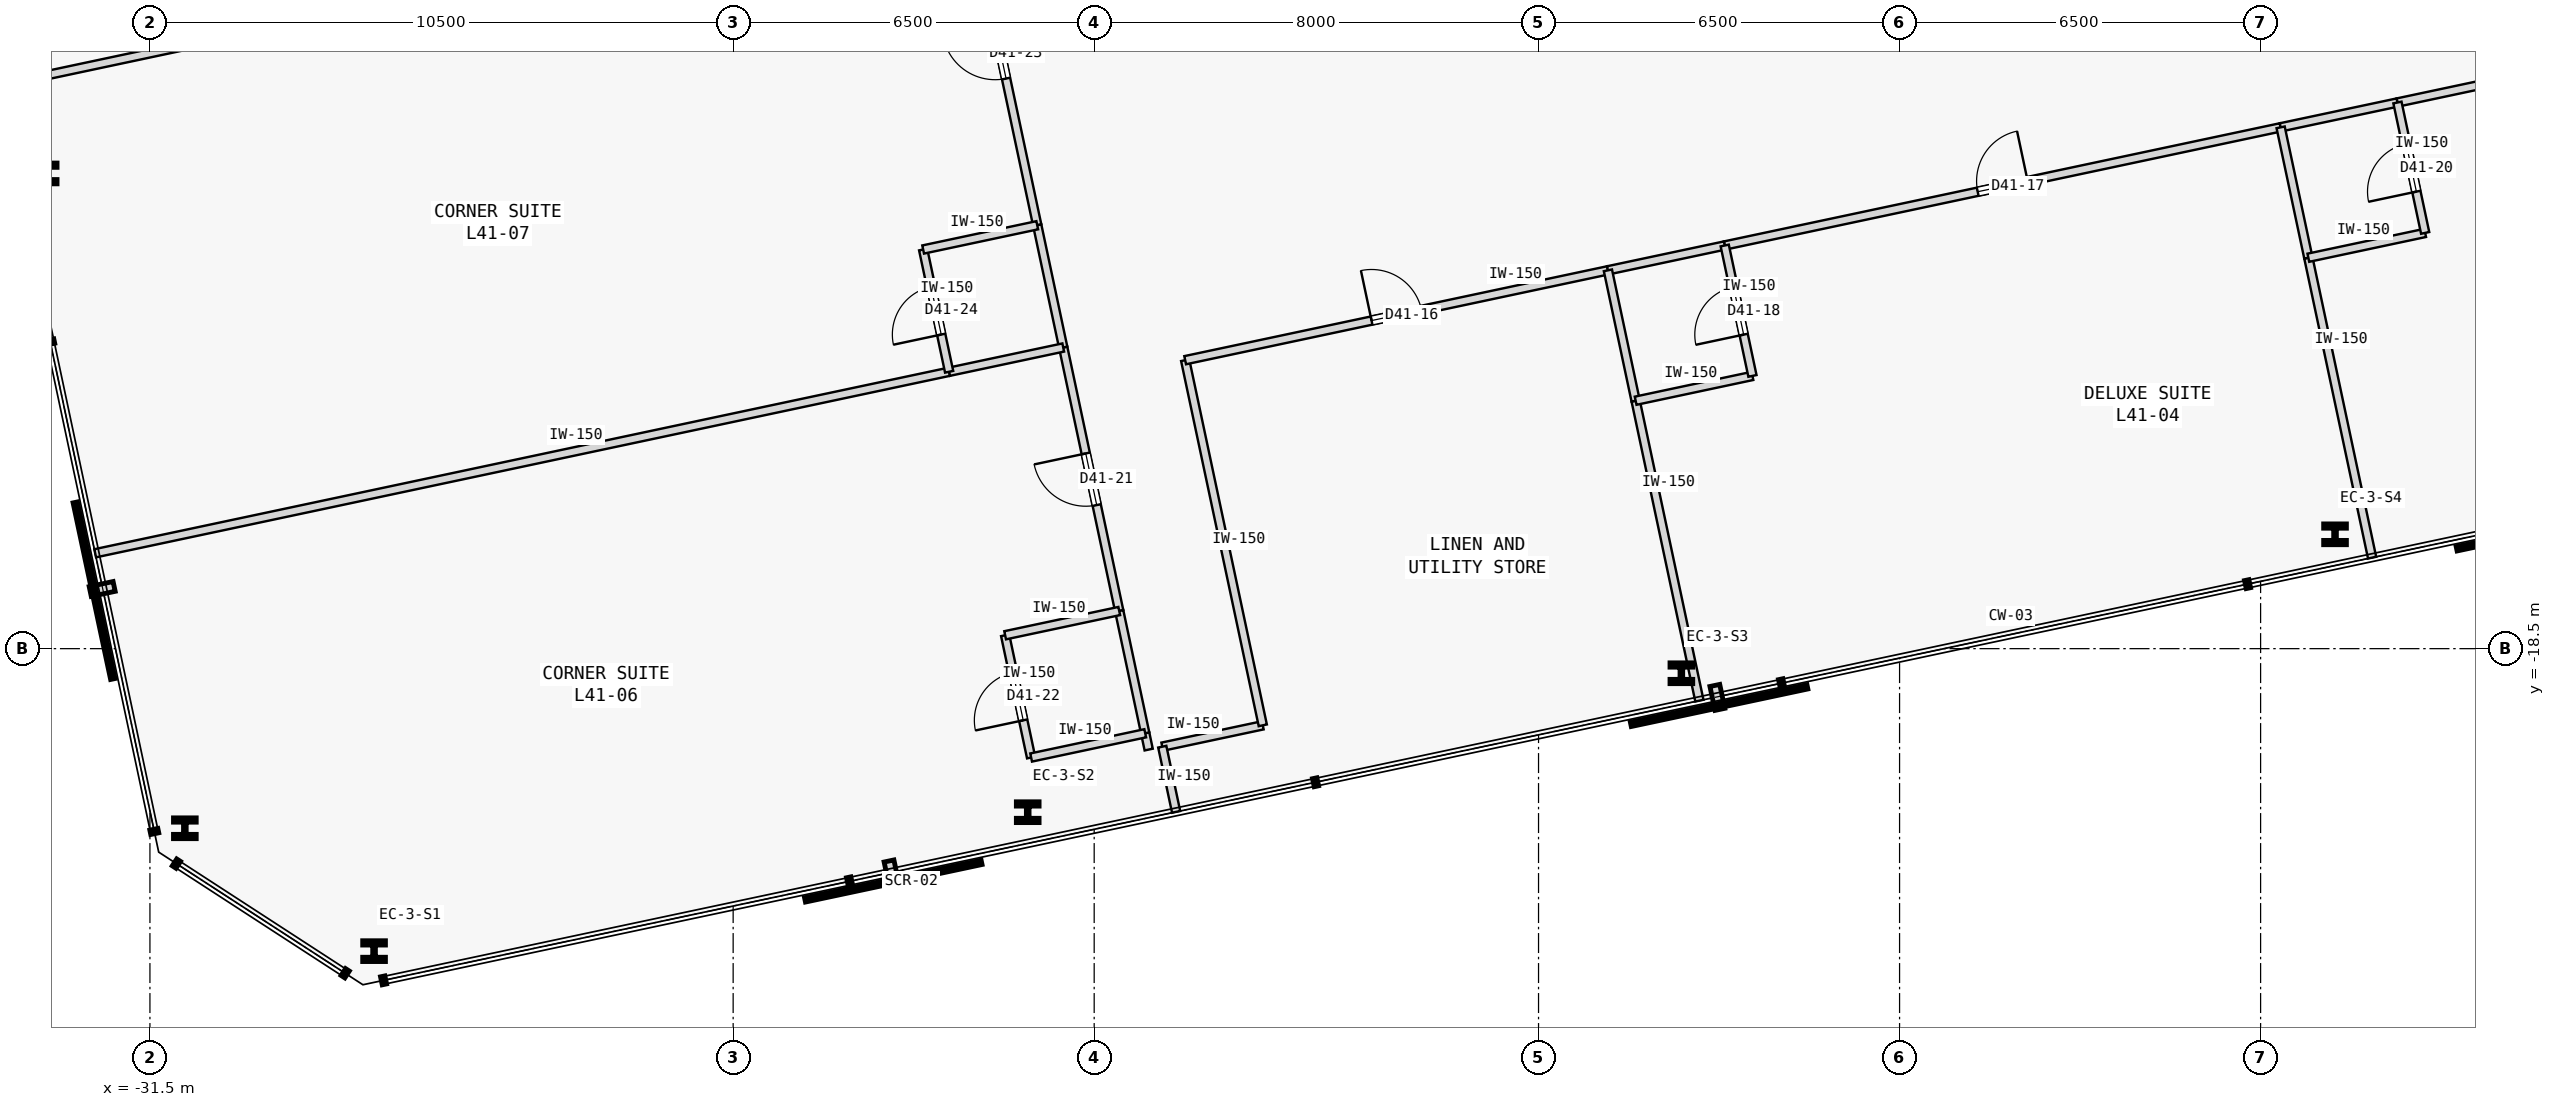
"""IFC4 building model, lengths in metres.
Left out: names, types, materials, properties, quantities, classifications, styles, units other than length and angle.
Written with IfcOpenShell. Run it as: python <this file> out.ifc"""

import sys

from ifc_helpers import new_model, si_unit, direction, frame, frame_2d, origin, origin_2d, place, context, subcontext, project, spatial, rectangle, i_section, extrude, element, fill, save


model = new_model("IFC4")
c1 = context("Model", 3, precision=1e-05, world=origin(), true_north=direction((0.0, 1.0)))
c2 = subcontext(c1, "Body", "Model", "MODEL_VIEW")
j1 = project(units=[si_unit("LENGTHUNIT", "METRE"), si_unit("PLANEANGLEUNIT", "RADIAN")], contexts=[c1])
p1 = place(None, origin())
s1 = spatial("IfcSite", under=j1, at=p1, CompositionType="ELEMENT")
p2 = place(p1, origin())
s2 = spatial("IfcBuilding", under=s1, at=p2, CompositionType="ELEMENT")
p3 = place(p2, frame((0.0, 0.0, 161.6)))
s3 = spatial("IfcBuildingStorey", under=s2, at=p3, CompositionType="ELEMENT", Elevation=161.6)
for number, where, z_axis, x_axis in (
    (1, (-27.465, -23.946, 0.0), (0.0, 0.0, 1.0), (1.0, 0.0, 0.0)),
    (2, (-15.697, -21.444, 0.0), (0.0, 0.0, 1.0), (1.0, 0.0, 0.0)),
    (3, (-3.928, -18.943, 0.0), (0.0, 0.0, 1.0), (1.0, 0.0, 0.0)),
    (4, (7.84, -16.441, 0.0), (0.0, 0.0, 1.0), (1.0, 0.0, 0.0)),
    (5, (-33.377, -9.945, 0.0), (0.0, 0.0, 1.0), (1.0, 0.0, 0.0)),
    (6, (-30.871, -21.733, 0.0), (0.0, 0.0, 1.0), (1.0, 0.0, 0.0)),
):
    element("IfcColumn", number, at=place(p3, frame(where, z_axis=z_axis, x_axis=x_axis)), inside=s3, PredefinedType="COLUMN", context=c2, shape_type="SweptSolid", body=[
        extrude(i_section(OverallWidth=0.409, OverallDepth=0.374, WebThickness=0.048, FlangeThickness=0.077, FilletRadius=0.015, at=origin_2d()), origin(), (0.0, 0.0, 1.0), 3.4),
    ])
p4 = place(p3, frame((-13.274, -20.265, 0.0), z_axis=(0.0, 0.0, 1.0), x_axis=(0.978160192495, 0.207852442415, 0.0)))
e7 = element("IfcWall", 7, at=p4, inside=s3, PredefinedType="PARTITIONING", context=c2, shape_type="SweptSolid", body=[
    extrude(rectangle(XDim=1.85, YDim=0.15, at=frame_2d((0.925, 0.0))), origin(), (0.0, 0.0, 1.0), 3.175),
])
p5 = place(p3, frame((-11.465, -19.88, 0.0), z_axis=(0.0, 0.0, 1.0), x_axis=(-0.207916109912, 0.978146661416, 0.0)))
e8 = element("IfcWall", 8, at=p5, inside=s3, PredefinedType="PARTITIONING", context=c2, shape_type="SweptSolid", body=[
    extrude(rectangle(XDim=6.72, YDim=0.15, at=frame_2d((3.36, 0.0))), origin(), (0.0, 0.0, 1.0), 3.175),
])
p6 = place(p3, frame((-12.862, -13.307, 0.0), z_axis=(0.0, 0.0, 1.0), x_axis=(0.978144096287, 0.20792817726, 0.0)))
e9 = element("IfcWall", 9, at=p6, inside=s3, PredefinedType="PARTITIONING", context=c2, shape_type="SweptSolid", body=[
    extrude(rectangle(XDim=7.781, YDim=0.15, at=frame_2d((3.891, 0.0))), origin(), (0.0, 0.0, 1.0), 3.175),
])
p7 = place(p6, frame((3.43, 0.0, 0.0)))
e10 = element("IfcOpeningElement", 10, at=p7, cuts=e9, PredefinedType="OPENING", context=c2, shape_type="SweptSolid", body=[
    extrude(rectangle(XDim=0.92, YDim=2.15, at=frame_2d((0.46, 1.075))), frame((0.0, 0.085, 0.0), z_axis=(0.0, -1.0, 0.0), x_axis=(1.0, 0.0, 0.0)), (0.0, 0.0, 1.0), 0.17),
])
p8 = place(p3, frame((-3.148, -11.242, 0.0), z_axis=(0.0, 0.0, 1.0), x_axis=(0.978150238925, 0.207899278718, 0.0)))
e11 = element("IfcWall", 11, at=p8, inside=s3, PredefinedType="PARTITIONING", context=c2, shape_type="SweptSolid", body=[
    extrude(rectangle(XDim=10.232, YDim=0.15, at=frame_2d((5.116, 0.0))), origin(), (0.0, 0.0, 1.0), 3.175),
])
p9 = place(p8, frame((4.656, 0.0, 0.0)))
e12 = element("IfcOpeningElement", 12, at=p9, cuts=e11, PredefinedType="OPENING", context=c2, shape_type="SweptSolid", body=[
    extrude(rectangle(XDim=0.92, YDim=2.15, at=frame_2d((0.46, 1.075))), frame((0.0, 0.085, 0.0), z_axis=(0.0, -1.0, 0.0), x_axis=(1.0, 0.0, 0.0)), (0.0, 0.0, 1.0), 0.17),
])
p10 = place(p3, frame((-5.251, -11.689, 0.0), z_axis=(0.0, 0.0, 1.0), x_axis=(0.978146728319, 0.207915795165, 0.0)))
e13 = element("IfcWall", 13, at=p10, inside=s3, PredefinedType="PARTITIONING", context=c2, shape_type="SweptSolid", body=[
    extrude(rectangle(XDim=2.15, YDim=0.15, at=frame_2d((1.075, 0.0))), origin(), (0.0, 0.0, 1.0), 3.175),
])
p11 = place(p3, frame((8.964, -8.668, 0.0), z_axis=(0.0, 0.0, 1.0), x_axis=(0.978149300771, 0.20790369261, 0.0)))
e14 = element("IfcWall", 14, at=p11, inside=s3, PredefinedType="PARTITIONING", context=c2, shape_type="SweptSolid", body=[
    extrude(rectangle(XDim=8.382, YDim=0.15, at=frame_2d((4.191, 0.0))), origin(), (0.0, 0.0, 1.0), 3.175),
])
p12 = place(p11, frame((3.731, 0.0, 0.0)))
e15 = element("IfcOpeningElement", 15, at=p12, cuts=e14, PredefinedType="OPENING", context=c2, shape_type="SweptSolid", body=[
    extrude(rectangle(XDim=0.92, YDim=2.15, at=frame_2d((0.46, 1.075))), frame((0.0, 0.085, 0.0), z_axis=(0.0, -1.0, 0.0), x_axis=(1.0, 0.0, 0.0)), (0.0, 0.0, 1.0), 0.17),
])
p13 = place(p3, frame((6.861, -9.115, 0.0), z_axis=(0.0, 0.0, 1.0), x_axis=(0.978146728319, 0.207915795165, 0.0)))
e16 = element("IfcWall", 16, at=p13, inside=s3, PredefinedType="PARTITIONING", context=c2, shape_type="SweptSolid", body=[
    extrude(rectangle(XDim=2.15, YDim=0.15, at=frame_2d((1.075, 0.0))), origin(), (0.0, 0.0, 1.0), 3.175),
])
p14 = place(p3, frame((-13.519, -20.317, 0.0), z_axis=(0.0, 0.0, 1.0), x_axis=(-0.207527808066, 0.978229118806, 0.0)))
e17 = element("IfcWall", 17, at=p14, inside=s3, PredefinedType="PARTITIONING", context=c2, shape_type="SweptSolid", body=[
    extrude(rectangle(XDim=0.3, YDim=0.15, at=frame_2d((0.15, 0.0))), origin(), (0.0, 0.0, 1.0), 3.175),
])
p15 = place(p3, frame((-14.049, -17.823, 0.0), z_axis=(0.0, 0.0, 1.0), x_axis=(-0.2079027059, 0.978149510494, 0.0)))
e18 = element("IfcWall", 18, at=p15, inside=s3, PredefinedType="PARTITIONING", context=c2, shape_type="SweptSolid", body=[
    extrude(rectangle(XDim=4.85, YDim=0.15, at=frame_2d((2.425, 0.0))), origin(), (0.0, 0.0, 1.0), 3.175),
])
p16 = place(p15, frame((1.95, 0.0, 0.0)))
e19 = element("IfcOpeningElement", 19, at=p16, cuts=e18, PredefinedType="OPENING", context=c2, shape_type="SweptSolid", body=[
    extrude(rectangle(XDim=0.95, YDim=2.15, at=frame_2d((0.475, 1.075))), frame((0.0, 0.085, 0.0), z_axis=(0.0, -1.0, 0.0), x_axis=(1.0, 0.0, 0.0)), (0.0, 0.0, 1.0), 0.17),
])
p17 = place(p3, frame((-13.581, -20.023, 0.0), z_axis=(0.0, 0.0, 1.0), x_axis=(-0.207891197838, 0.978151956427, 0.0)))
e20 = element("IfcWall", 20, at=p17, inside=s3, PredefinedType="PARTITIONING", context=c2, shape_type="SweptSolid", body=[
    extrude(rectangle(XDim=2.25, YDim=0.15, at=frame_2d((1.125, 0.0))), origin(), (0.0, 0.0, 1.0), 3.175),
])
p18 = place(p3, frame((-15.525, -10.878, 0.0), z_axis=(0.0, 0.0, 1.0), x_axis=(-0.207887725283, 0.978152694459, 0.0)))
e21 = element("IfcWall", 21, at=p18, inside=s3, PredefinedType="PARTITIONING", context=c2, shape_type="SweptSolid", body=[
    extrude(rectangle(XDim=6.35, YDim=0.15, at=frame_2d((3.175, 0.0))), origin(), (0.0, 0.0, 1.0), 3.175),
])
p19 = place(p18, frame((2.7, 0.0, 0.0)))
e22 = element("IfcOpeningElement", 22, at=p19, cuts=e21, PredefinedType="OPENING", context=c2, shape_type="SweptSolid", body=[
    extrude(rectangle(XDim=0.95, YDim=2.15, at=frame_2d((0.475, 1.075))), frame((0.0, 0.085, 0.0), z_axis=(0.0, -1.0, 0.0), x_axis=(1.0, 0.0, 0.0)), (0.0, 0.0, 1.0), 0.17),
])
p20 = place(p3, frame((-15.057, -13.079, 0.0), z_axis=(0.0, 0.0, 1.0), x_axis=(-0.207995007687, 0.978129887478, 0.0)))
e23 = element("IfcWall", 23, at=p20, inside=s3, PredefinedType="PARTITIONING", context=c2, shape_type="SweptSolid", body=[
    extrude(rectangle(XDim=2.25, YDim=0.15, at=frame_2d((1.125, 0.0))), origin(), (0.0, 0.0, 1.0), 3.175),
])
p21 = place(p3, frame((-3.604, -19.436, 0.0), z_axis=(0.0, 0.0, 1.0), x_axis=(-0.20791588359, 0.978146709523, 0.0)))
e24 = element("IfcWall", 24, at=p21, inside=s3, PredefinedType="PARTITIONING", context=c2, shape_type="SweptSolid", body=[
    extrude(rectangle(XDim=5.52, YDim=0.15, at=frame_2d((2.76, 0.0))), origin(), (0.0, 0.0, 1.0), 3.175),
])
p22 = place(p3, frame((-4.752, -14.037, 0.0), z_axis=(0.0, 0.0, 1.0), x_axis=(-0.207917150959, 0.978146440129, 0.0)))
e25 = element("IfcWall", 25, at=p22, inside=s3, PredefinedType="PARTITIONING", context=c2, shape_type="SweptSolid", body=[
    extrude(rectangle(XDim=2.4, YDim=0.15, at=frame_2d((1.2, 0.0))), origin(), (0.0, 0.0, 1.0), 3.175),
])
p23 = place(p3, frame((-13.025, -21.439, 0.0), z_axis=(0.0, 0.0, 1.0), x_axis=(-0.207917150959, 0.978146440129, 0.0)))
e26 = element("IfcWall", 26, at=p23, inside=s3, PredefinedType="PARTITIONING", context=c2, shape_type="SweptSolid", body=[
    extrude(rectangle(XDim=1.2, YDim=0.15, at=frame_2d((0.6, 0.0))), origin(), (0.0, 0.0, 1.0), 3.175),
])
p24 = place(p3, frame((-4.752, -14.037, 0.0), z_axis=(0.0, 0.0, 1.0), x_axis=(0.978146728319, 0.207915795165, 0.0)))
e27 = element("IfcWall", 27, at=p24, inside=s3, PredefinedType="PARTITIONING", context=c2, shape_type="SweptSolid", body=[
    extrude(rectangle(XDim=2.15, YDim=0.15, at=frame_2d((1.075, 0.0))), origin(), (0.0, 0.0, 1.0), 3.175),
])
p25 = place(p3, frame((-2.649, -13.59, 0.0), z_axis=(0.0, 0.0, 1.0), x_axis=(-0.207917150959, 0.978146440129, 0.0)))
e28 = element("IfcWall", 28, at=p25, inside=s3, PredefinedType="PARTITIONING", context=c2, shape_type="SweptSolid", body=[
    extrude(rectangle(XDim=2.4, YDim=0.15, at=frame_2d((1.2, 0.0))), origin(), (0.0, 0.0, 1.0), 3.175),
])
p26 = place(p25, frame((0.76, 0.0, 0.0)))
e29 = element("IfcOpeningElement", 29, at=p26, cuts=e28, PredefinedType="OPENING", context=c2, shape_type="SweptSolid", body=[
    extrude(rectangle(XDim=0.88, YDim=2.15, at=frame_2d((0.44, 1.075))), frame((0.0, 0.085, 0.0), z_axis=(0.0, -1.0, 0.0), x_axis=(1.0, 0.0, 0.0)), (0.0, 0.0, 1.0), 0.17),
])
p27 = place(p3, frame((8.507, -16.862, 0.0), z_axis=(0.0, 0.0, 1.0), x_axis=(-0.20791588359, 0.978146709523, 0.0)))
e30 = element("IfcWall", 30, at=p27, inside=s3, PredefinedType="PARTITIONING", context=c2, shape_type="SweptSolid", body=[
    extrude(rectangle(XDim=5.52, YDim=0.15, at=frame_2d((2.76, 0.0))), origin(), (0.0, 0.0, 1.0), 3.175),
])
p28 = place(p3, frame((7.36, -11.462, 0.0), z_axis=(0.0, 0.0, 1.0), x_axis=(-0.207937840262, 0.978142042133, 0.0)))
e31 = element("IfcWall", 31, at=p28, inside=s3, PredefinedType="PARTITIONING", context=c2, shape_type="SweptSolid", body=[
    extrude(rectangle(XDim=2.4, YDim=0.15, at=frame_2d((1.2, 0.0))), origin(), (0.0, 0.0, 1.0), 3.175),
])
p29 = place(p3, frame((7.36, -11.462, 0.0), z_axis=(0.0, 0.0, 1.0), x_axis=(0.978146728319, 0.207915795165, 0.0)))
e32 = element("IfcWall", 32, at=p29, inside=s3, PredefinedType="PARTITIONING", context=c2, shape_type="SweptSolid", body=[
    extrude(rectangle(XDim=2.15, YDim=0.15, at=frame_2d((1.075, 0.0))), origin(), (0.0, 0.0, 1.0), 3.175),
])
p30 = place(p3, frame((9.463, -11.015, 0.0), z_axis=(0.0, 0.0, 1.0), x_axis=(-0.207937840262, 0.978142042133, 0.0)))
e33 = element("IfcWall", 33, at=p30, inside=s3, PredefinedType="PARTITIONING", context=c2, shape_type="SweptSolid", body=[
    extrude(rectangle(XDim=2.4, YDim=0.15, at=frame_2d((1.2, 0.0))), origin(), (0.0, 0.0, 1.0), 3.175),
])
p31 = place(p30, frame((0.76, 0.0, 0.0)))
e34 = element("IfcOpeningElement", 34, at=p31, cuts=e33, PredefinedType="OPENING", context=c2, shape_type="SweptSolid", body=[
    extrude(rectangle(XDim=0.88, YDim=2.15, at=frame_2d((0.44, 1.075))), frame((0.0, 0.085, 0.0), z_axis=(0.0, -1.0, 0.0), x_axis=(1.0, 0.0, 0.0)), (0.0, 0.0, 1.0), 0.17),
])
p32 = place(p3, frame((-15.635, -20.46, 0.0), z_axis=(0.0, 0.0, 1.0), x_axis=(-0.207913264065, 0.978147266328, 0.0)))
e35 = element("IfcWall", 35, at=p32, inside=s3, PredefinedType="PARTITIONING", context=c2, shape_type="SweptSolid", body=[
    extrude(rectangle(XDim=2.25, YDim=0.15, at=frame_2d((1.125, 0.0))), origin(), (0.0, 0.0, 1.0), 3.175),
])
p33 = place(p32, frame((0.685, 0.0, 0.0)))
e36 = element("IfcOpeningElement", 36, at=p33, cuts=e35, PredefinedType="OPENING", context=c2, shape_type="SweptSolid", body=[
    extrude(rectangle(XDim=0.88, YDim=2.15, at=frame_2d((0.44, 1.075))), frame((0.0, 0.085, 0.0), z_axis=(0.0, -1.0, 0.0), x_axis=(1.0, 0.0, 0.0)), (0.0, 0.0, 1.0), 0.17),
])
for number, where, z_axis, x_axis in (
    (37, (-15.635, -20.46, 0.0), (0.0, 0.0, 1.0), (0.978, 0.208, 0.0)),
    (38, (-16.103, -18.259, 0.0), (0.0, 0.0, 1.0), (0.978, 0.208, 0.0)),
):
    element("IfcWall", number, at=place(p3, frame(where, z_axis=z_axis, x_axis=x_axis)), inside=s3, PredefinedType="PARTITIONING", context=c2, shape_type="SweptSolid", body=[
        extrude(rectangle(XDim=2.1, YDim=0.15, at=frame_2d((1.05, 0.0))), origin(), (0.0, 0.0, 1.0), 3.175),
    ])
p34 = place(p3, frame((-32.486, -16.783, 0.0), z_axis=(0.0, 0.0, 1.0), x_axis=(0.978146137903, 0.207918572776, 0.0)))
e39 = element("IfcWall", 39, at=p34, inside=s3, PredefinedType="PARTITIONING", context=c2, shape_type="SweptSolid", body=[
    extrude(rectangle(XDim=15.718, YDim=0.15, at=frame_2d((7.859, 0.0))), origin(), (0.0, 0.0, 1.0), 3.175),
])
p35 = place(p3, frame((-17.111, -13.515, 0.0), z_axis=(0.0, 0.0, 1.0), x_axis=(0.97815826, 0.207861536591, 0.0)))
e40 = element("IfcWall", 40, at=p35, inside=s3, PredefinedType="PARTITIONING", context=c2, shape_type="SweptSolid", body=[
    extrude(rectangle(XDim=2.1, YDim=0.15, at=frame_2d((1.05, 0.0))), origin(), (0.0, 0.0, 1.0), 3.175),
])
p36 = place(p3, frame((-17.111, -13.515, 0.0), z_axis=(0.0, 0.0, 1.0), x_axis=(-0.207913264065, 0.978147266328, 0.0)))
e41 = element("IfcWall", 41, at=p36, inside=s3, PredefinedType="PARTITIONING", context=c2, shape_type="SweptSolid", body=[
    extrude(rectangle(XDim=2.25, YDim=0.15, at=frame_2d((1.125, 0.0))), origin(), (0.0, 0.0, 1.0), 3.175),
])
p37 = place(p36, frame((0.685, 0.0, 0.0)))
e42 = element("IfcOpeningElement", 42, at=p37, cuts=e41, PredefinedType="OPENING", context=c2, shape_type="SweptSolid", body=[
    extrude(rectangle(XDim=0.88, YDim=2.15, at=frame_2d((0.44, 1.075))), frame((0.0, 0.085, 0.0), z_axis=(0.0, -1.0, 0.0), x_axis=(1.0, 0.0, 0.0)), (0.0, 0.0, 1.0), 0.17),
])
p38 = place(p3, frame((-17.579, -11.314, 0.0), z_axis=(0.0, 0.0, 1.0), x_axis=(0.978129588365, 0.207996414309, 0.0)))
e43 = element("IfcWall", 43, at=p38, inside=s3, PredefinedType="PARTITIONING", context=c2, shape_type="SweptSolid", body=[
    extrude(rectangle(XDim=2.1, YDim=0.15, at=frame_2d((1.05, 0.0))), origin(), (0.0, 0.0, 1.0), 3.175),
])
p39 = place(p3, frame((-34.274, -8.371, 0.0), z_axis=(0.0, 0.0, 1.0), x_axis=(0.978146137903, 0.207918572776, 0.0)))
e44 = element("IfcWall", 44, at=p39, inside=s3, PredefinedType="PARTITIONING", context=c2, shape_type="SweptSolid", body=[
    extrude(rectangle(XDim=15.718, YDim=0.15, at=frame_2d((7.859, 0.0))), origin(), (0.0, 0.0, 1.0), 3.175),
])
p40 = place(p7, origin())
e45 = element("IfcDoor", 45, at=p40, inside=s3, OperationType="SINGLE_SWING_LEFT", PredefinedType="DOOR", context=c2, shape_type="SweptSolid", body=[
    extrude(rectangle(XDim=0.92, YDim=2.15, at=frame_2d((0.46, 1.075))), frame((0.0, 0.025, 0.0), z_axis=(0.0, -1.0, 0.0), x_axis=(1.0, 0.0, 0.0)), (0.0, 0.0, 1.0), 0.05),
])
fill(e10, e45)
p41 = place(p9, origin())
e46 = element("IfcDoor", 46, at=p41, inside=s3, OperationType="SINGLE_SWING_RIGHT", PredefinedType="DOOR", context=c2, shape_type="SweptSolid", body=[
    extrude(rectangle(XDim=0.92, YDim=2.15, at=frame_2d((0.46, 1.075))), frame((0.0, 0.025, 0.0), z_axis=(0.0, -1.0, 0.0), x_axis=(1.0, 0.0, 0.0)), (0.0, 0.0, 1.0), 0.05),
])
fill(e12, e46)
p42 = place(p26, origin())
e47 = element("IfcDoor", 47, at=p42, inside=s3, OperationType="SINGLE_SWING_LEFT", PredefinedType="DOOR", context=c2, shape_type="SweptSolid", body=[
    extrude(rectangle(XDim=0.88, YDim=2.15, at=frame_2d((0.44, 1.075))), frame((0.0, 0.025, 0.0), z_axis=(0.0, -1.0, 0.0), x_axis=(1.0, 0.0, 0.0)), (0.0, 0.0, 1.0), 0.05),
])
fill(e29, e47)
p43 = place(p31, origin())
e48 = element("IfcDoor", 48, at=p43, inside=s3, OperationType="SINGLE_SWING_LEFT", PredefinedType="DOOR", context=c2, shape_type="SweptSolid", body=[
    extrude(rectangle(XDim=0.88, YDim=2.15, at=frame_2d((0.44, 1.075))), frame((0.0, 0.025, 0.0), z_axis=(0.0, -1.0, 0.0), x_axis=(1.0, 0.0, 0.0)), (0.0, 0.0, 1.0), 0.05),
])
fill(e34, e48)
p44 = place(p16, origin())
e49 = element("IfcDoor", 49, at=p44, inside=s3, OperationType="SINGLE_SWING_RIGHT", PredefinedType="DOOR", context=c2, shape_type="SweptSolid", body=[
    extrude(rectangle(XDim=0.95, YDim=2.15, at=frame_2d((0.475, 1.075))), frame((0.0, 0.025, 0.0), z_axis=(0.0, -1.0, 0.0), x_axis=(1.0, 0.0, 0.0)), (0.0, 0.0, 1.0), 0.05),
])
fill(e19, e49)
p45 = place(p33, origin())
e50 = element("IfcDoor", 50, at=p45, inside=s3, OperationType="SINGLE_SWING_LEFT", PredefinedType="DOOR", context=c2, shape_type="SweptSolid", body=[
    extrude(rectangle(XDim=0.88, YDim=2.15, at=frame_2d((0.44, 1.075))), frame((0.0, 0.025, 0.0), z_axis=(0.0, -1.0, 0.0), x_axis=(1.0, 0.0, 0.0)), (0.0, 0.0, 1.0), 0.05),
])
fill(e36, e50)
p46 = place(p19, origin())
e51 = element("IfcDoor", 51, at=p46, inside=s3, OperationType="SINGLE_SWING_RIGHT", PredefinedType="DOOR", context=c2, shape_type="SweptSolid", body=[
    extrude(rectangle(XDim=0.95, YDim=2.15, at=frame_2d((0.475, 1.075))), frame((0.0, 0.025, 0.0), z_axis=(0.0, -1.0, 0.0), x_axis=(1.0, 0.0, 0.0)), (0.0, 0.0, 1.0), 0.05),
])
fill(e22, e51)
p47 = place(p37, origin())
e52 = element("IfcDoor", 52, at=p47, inside=s3, OperationType="SINGLE_SWING_LEFT", PredefinedType="DOOR", context=c2, shape_type="SweptSolid", body=[
    extrude(rectangle(XDim=0.88, YDim=2.15, at=frame_2d((0.44, 1.075))), frame((0.0, 0.025, 0.0), z_axis=(0.0, -1.0, 0.0), x_axis=(1.0, 0.0, 0.0)), (0.0, 0.0, 1.0), 0.05),
])
fill(e42, e52)
save(model, sys.argv[1])
